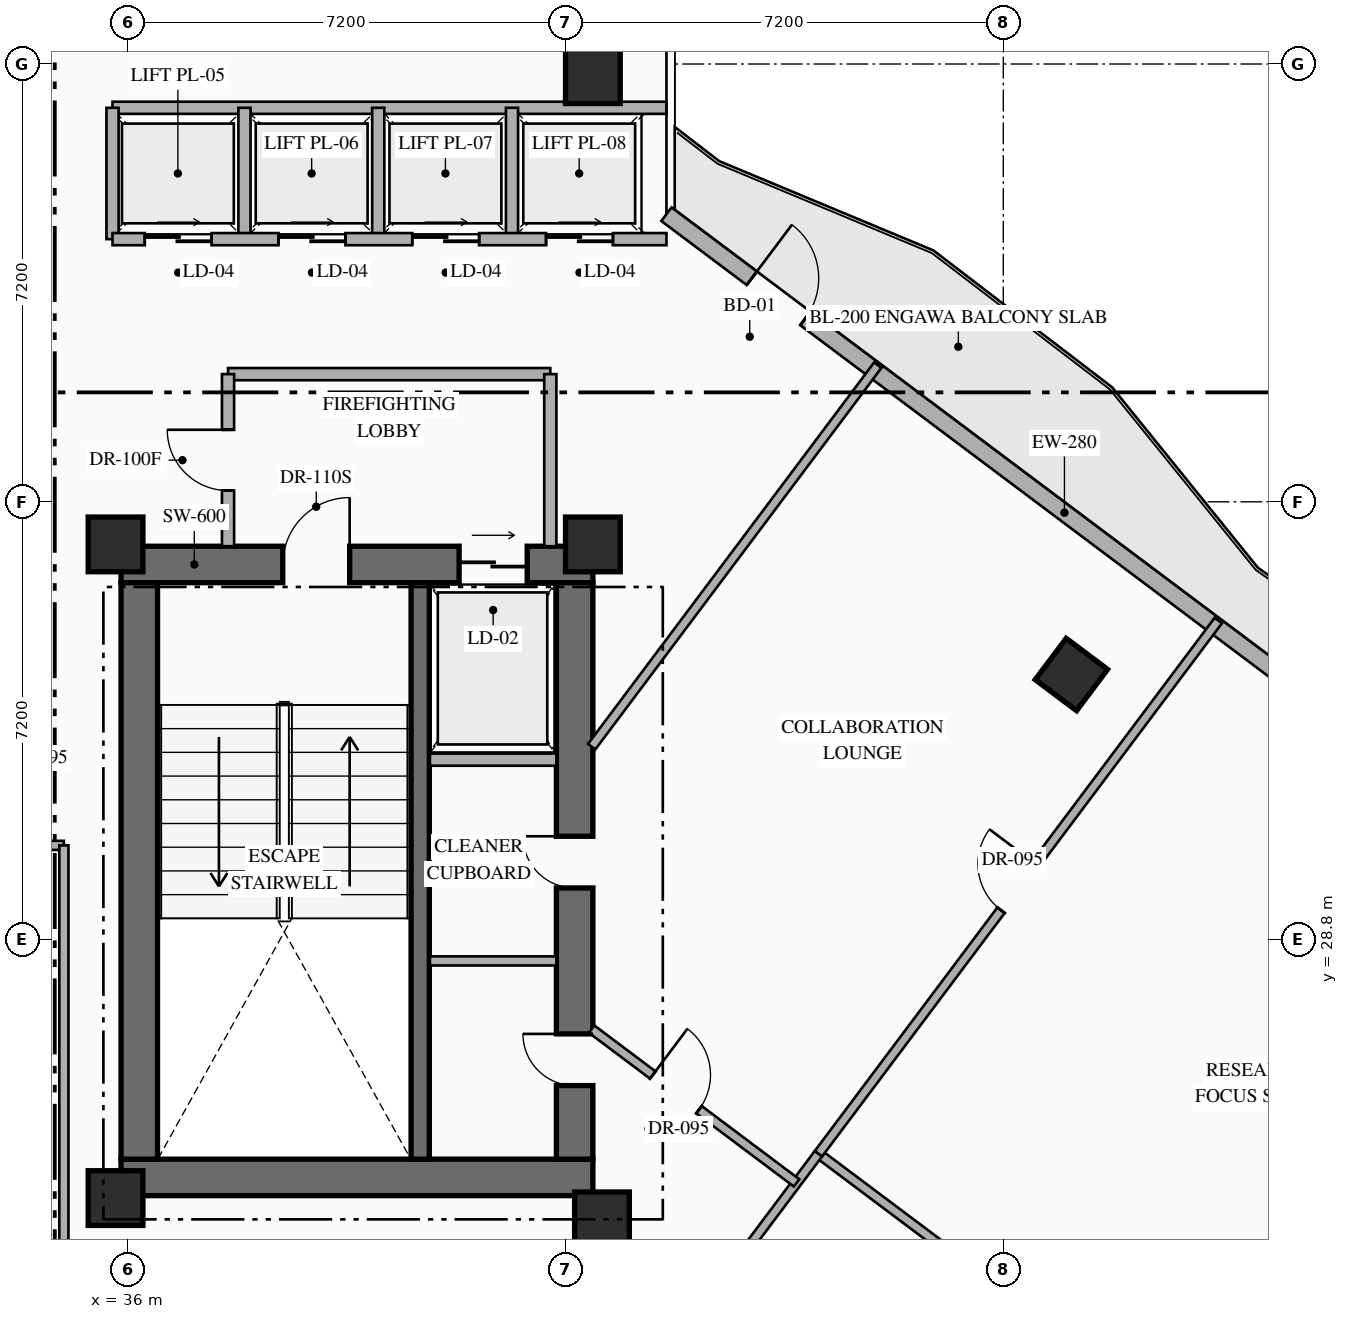
"""IFC4 building model, lengths in metres.
Left out: names, types, materials, properties, quantities, classifications, styles, units other than length and angle.
Written with IfcOpenShell. Run it as: python <this file> out.ifc"""

import sys

from ifc_helpers import new_model, si_unit, direction, frame, frame_2d, origin, origin_2d, place, context, subcontext, project, spatial, rectangle, hollow_rectangle, extrude, element, fill, save


model = new_model("IFC4")
c1 = context("Model", 3, precision=1e-05, world=origin(), true_north=direction((0.0, 1.0)))
c2 = subcontext(c1, "Body", "Model", "MODEL_VIEW")
j1 = project(units=[si_unit("LENGTHUNIT", "METRE"), si_unit("PLANEANGLEUNIT", "RADIAN")], contexts=[c1])
p1 = place(None, origin())
s1 = spatial("IfcSite", under=j1, at=p1, CompositionType="ELEMENT")
p2 = place(p1, origin())
s2 = spatial("IfcBuilding", under=s1, at=p2, CompositionType="ELEMENT")
p3 = place(p2, frame((0.0, 0.0, 156.45)))
s3 = spatial("IfcBuildingStorey", under=s2, at=p3, CompositionType="ELEMENT", Elevation=156.45)
p4 = place(p3, frame((35.89, 24.89, 0.0), z_axis=(0.0, 0.0, 1.0), x_axis=(1.0, 0.0, 0.0)))
e1 = element("IfcWall", 1, at=p4, inside=s3, PredefinedType="SHEAR", context=c2, shape_type="SweptSolid", body=[
    extrude(rectangle(XDim=7.76, YDim=0.6, at=frame_2d((3.88, 0.0))), origin(), (0.0, 0.0, 1.0), 3.6),
])
p5 = place(p3, frame((35.89, 34.97, 0.0), z_axis=(0.0, 0.0, 1.0), x_axis=(1.0, 0.0, 0.0)))
e2 = element("IfcWall", 2, at=p5, inside=s3, PredefinedType="SHEAR", context=c2, shape_type="SweptSolid", body=[
    extrude(rectangle(XDim=7.76, YDim=0.6, at=frame_2d((3.88, 0.0))), origin(), (0.0, 0.0, 1.0), 3.6),
])
p6 = place(p5, frame((2.66, 0.0, 0.0)))
e3 = element("IfcOpeningElement", 3, at=p6, cuts=e2, PredefinedType="OPENING", context=c2, shape_type="SweptSolid", body=[
    extrude(rectangle(XDim=1.1, YDim=2.2, at=frame_2d((0.55, 1.1))), frame((0.0, 0.31, 0.0), z_axis=(0.0, -1.0, 0.0), x_axis=(1.0, 0.0, 0.0)), (0.0, 0.0, 1.0), 0.62),
])
p7 = place(p5, frame((5.56, 0.0, 0.0)))
e4 = element("IfcOpeningElement", 4, at=p7, cuts=e2, PredefinedType="OPENING", context=c2, shape_type="SweptSolid", body=[
    extrude(rectangle(XDim=1.12, YDim=2.15, at=frame_2d((0.56, 1.075))), frame((0.0, 0.31, 0.0), z_axis=(0.0, -1.0, 0.0), x_axis=(1.0, 0.0, 0.0)), (0.0, 0.0, 1.0), 0.62),
])
p8 = place(p3, frame((36.19, 25.19, 0.0), z_axis=(0.0, 0.0, 1.0), x_axis=(0.0, 1.0, 0.0)))
e5 = element("IfcWall", 5, at=p8, inside=s3, PredefinedType="SHEAR", context=c2, shape_type="SweptSolid", body=[
    extrude(rectangle(XDim=9.48, YDim=0.6, at=frame_2d((4.74, 0.0))), origin(), (0.0, 0.0, 1.0), 3.6),
])
p9 = place(p3, frame((43.35, 25.19, 0.0), z_axis=(0.0, 0.0, 1.0), x_axis=(0.0, 1.0, 0.0)))
e6 = element("IfcWall", 6, at=p9, inside=s3, PredefinedType="SHEAR", context=c2, shape_type="SweptSolid", body=[
    extrude(rectangle(XDim=9.48, YDim=0.6, at=frame_2d((4.74, 0.0))), origin(), (0.0, 0.0, 1.0), 3.6),
])
p10 = place(p9, frame((1.21, 0.0, 0.0)))
e7 = element("IfcOpeningElement", 7, at=p10, cuts=e6, PredefinedType="OPENING", context=c2, shape_type="SweptSolid", body=[
    extrude(rectangle(XDim=0.85, YDim=2.08, at=frame_2d((0.425, 1.04))), frame((0.0, 0.31, 0.0), z_axis=(0.0, -1.0, 0.0), x_axis=(1.0, 0.0, 0.0)), (0.0, 0.0, 1.0), 0.62),
])
p11 = place(p9, frame((4.46, 0.0, 0.0)))
e8 = element("IfcOpeningElement", 8, at=p11, cuts=e6, PredefinedType="OPENING", context=c2, shape_type="SweptSolid", body=[
    extrude(rectangle(XDim=0.85, YDim=2.08, at=frame_2d((0.425, 1.04))), frame((0.0, 0.31, 0.0), z_axis=(0.0, -1.0, 0.0), x_axis=(1.0, 0.0, 0.0)), (0.0, 0.0, 1.0), 0.62),
])
p12 = place(p3, frame((40.81, 25.19, 0.0), z_axis=(0.0, 0.0, 1.0), x_axis=(0.0, 1.0, 0.0)))
e9 = element("IfcWall", 9, at=p12, inside=s3, PredefinedType="SHEAR", context=c2, shape_type="SweptSolid", body=[
    extrude(rectangle(XDim=9.48, YDim=0.3, at=frame_2d((4.74, 0.0))), origin(), (0.0, 0.0, 1.0), 3.6),
])
for number, where, z_axis, x_axis in (
    (10, (35.8, 24.55, 0.0), (0.0, 0.0, 1.0), (1.0, 0.0, 0.0)),
    (11, (43.8, 24.2, 0.0), (0.0, 0.0, 1.0), (1.0, 0.0, 0.0)),
    (12, (35.8, 35.3, 0.0), (0.0, 0.0, 1.0), (1.0, 0.0, 0.0)),
    (13, (43.65, 35.3, 0.0), (0.0, 0.0, 1.0), (1.0, 0.0, 0.0)),
    (14, (43.65, 43.0, 0.0), (0.0, 0.0, 1.0), (1.0, 0.0, 0.0)),
):
    element("IfcColumn", number, at=place(p3, frame(where, z_axis=z_axis, x_axis=x_axis)), inside=s3, PredefinedType="COLUMN", context=c2, shape_type="SweptSolid", body=[
        extrude(rectangle(XDim=0.9, YDim=0.9, at=origin_2d()), origin(), (0.0, 0.0, 1.0), 3.6),
    ])
p13 = place(p3, frame((51.52, 33.16, 0.0), z_axis=(0.0, 0.0, 1.0), x_axis=(0.799999996291, -0.600000004945, 0.0)))
e15 = element("IfcColumn", 15, at=p13, inside=s3, PredefinedType="COLUMN", context=c2, shape_type="SweptSolid", body=[
    extrude(hollow_rectangle(XDim=0.85, YDim=0.85, WallThickness=0.032, at=origin_2d()), origin(), (0.0, 0.0, 1.0), 3.6),
])
p14 = place(p3, frame((44.86, 40.73, 0.0), z_axis=(0.0, 0.0, 1.0), x_axis=(0.800007624502, -0.599989833863, 0.0)))
e16 = element("IfcWall", 16, at=p14, inside=s3, PredefinedType="STANDARD", context=c2, shape_type="SweptSolid", body=[
    extrude(rectangle(XDim=19.212, YDim=0.28, at=frame_2d((9.606, 0.0))), origin(), (0.0, 0.0, 1.0), 3.35),
])
p15 = place(p14, frame((1.755, 0.0, 0.0)))
e17 = element("IfcOpeningElement", 17, at=p15, cuts=e16, PredefinedType="OPENING", context=c2, shape_type="SweptSolid", body=[
    extrude(rectangle(XDim=1.1, YDim=2.2, at=frame_2d((0.55, 1.1))), frame((0.0, 0.15, 0.0), z_axis=(0.0, -1.0, 0.0), x_axis=(1.0, 0.0, 0.0)), (0.0, 0.0, 1.0), 0.3),
])
p16 = place(p14, frame((13.509, 0.0, 0.85)))
e18 = element("IfcOpeningElement", 18, at=p16, cuts=e16, PredefinedType="OPENING", context=c2, shape_type="SweptSolid", body=[
    extrude(rectangle(XDim=1.8, YDim=2.1, at=frame_2d((0.9, 1.05))), frame((0.0, 0.15, 0.0), z_axis=(0.0, -1.0, 0.0), x_axis=(1.0, 0.0, 0.0)), (0.0, 0.0, 1.0), 0.3),
])
p17 = place(p3, frame((40.97, 31.76, 0.0), z_axis=(0.0, 0.0, 1.0), x_axis=(1.0, 0.0, 0.0)))
e19 = element("IfcWall", 19, at=p17, inside=s3, PredefinedType="STANDARD", context=c2, shape_type="SweptSolid", body=[
    extrude(rectangle(XDim=2.08, YDim=0.2, at=frame_2d((1.04, 0.0))), origin(), (0.0, 0.0, 1.0), 3.35),
])
p18 = place(p3, frame((40.97, 28.45, 0.0), z_axis=(0.0, 0.0, 1.0), x_axis=(1.0, 0.0, 0.0)))
e20 = element("IfcWall", 20, at=p18, inside=s3, PredefinedType="PARTITIONING", context=c2, shape_type="SweptSolid", body=[
    extrude(rectangle(XDim=2.08, YDim=0.15, at=frame_2d((1.04, 0.0))), origin(), (0.0, 0.0, 1.0), 3.35),
])
p19 = place(p3, frame((37.65, 38.1, 0.0), z_axis=(0.0, 0.0, 1.0), x_axis=(1.0, 0.0, 0.0)))
e21 = element("IfcWall", 21, at=p19, inside=s3, PredefinedType="STANDARD", context=c2, shape_type="SweptSolid", body=[
    extrude(rectangle(XDim=5.3, YDim=0.2, at=frame_2d((2.65, 0.0))), origin(), (0.0, 0.0, 1.0), 3.35),
])
p20 = place(p3, frame((42.95, 35.27, 0.0), z_axis=(0.0, 0.0, 1.0), x_axis=(0.0, 1.0, 0.0)))
e22 = element("IfcWall", 22, at=p20, inside=s3, PredefinedType="STANDARD", context=c2, shape_type="SweptSolid", body=[
    extrude(rectangle(XDim=2.83, YDim=0.2, at=frame_2d((1.415, 0.0))), origin(), (0.0, 0.0, 1.0), 3.35),
])
p21 = place(p3, frame((37.65, 35.27, 0.0), z_axis=(0.0, 0.0, 1.0), x_axis=(0.0, 1.0, 0.0)))
e23 = element("IfcWall", 23, at=p21, inside=s3, PredefinedType="STANDARD", context=c2, shape_type="SweptSolid", body=[
    extrude(rectangle(XDim=2.83, YDim=0.2, at=frame_2d((1.415, 0.0))), origin(), (0.0, 0.0, 1.0), 3.35),
])
p22 = place(p21, frame((0.915, 0.0, 0.0)))
e24 = element("IfcOpeningElement", 24, at=p22, cuts=e23, PredefinedType="OPENING", context=c2, shape_type="SweptSolid", body=[
    extrude(rectangle(XDim=1.0, YDim=2.2, at=frame_2d((0.5, 1.1))), frame((0.0, 0.11, 0.0), z_axis=(0.0, -1.0, 0.0), x_axis=(1.0, 0.0, 0.0)), (0.0, 0.0, 1.0), 0.22),
])
p23 = place(p3, frame((35.75, 42.48, 0.0), z_axis=(0.0, 0.0, 1.0), x_axis=(1.0, 0.0, 0.0)))
e25 = element("IfcWall", 25, at=p23, inside=s3, PredefinedType="STANDARD", context=c2, shape_type="SweptSolid", body=[
    extrude(rectangle(XDim=9.11, YDim=0.2, at=frame_2d((4.555, 0.0))), origin(), (0.0, 0.0, 1.0), 3.35),
])
for number, where, z_axis, x_axis in (
    (26, (35.75, 40.32, 0.0), (0.0, 0.0, 1.0), (0.0, 1.0, 0.0)),
    (27, (37.92, 40.32, 0.0), (0.0, 0.0, 1.0), (0.0, 1.0, 0.0)),
    (28, (40.12, 40.32, 0.0), (0.0, 0.0, 1.0), (0.0, 1.0, 0.0)),
    (29, (42.32, 40.32, 0.0), (0.0, 0.0, 1.0), (0.0, 1.0, 0.0)),
):
    element("IfcWall", number, at=place(p3, frame(where, z_axis=z_axis, x_axis=x_axis)), inside=s3, PredefinedType="STANDARD", context=c2, shape_type="SweptSolid", body=[
        extrude(rectangle(XDim=2.16, YDim=0.2, at=frame_2d((1.08, 0.0))), origin(), (0.0, 0.0, 1.0), 3.35),
    ])
p24 = place(p3, frame((35.75, 40.32, 0.0), z_axis=(0.0, 0.0, 1.0), x_axis=(1.0, 0.0, 0.0)))
e30 = element("IfcWall", 30, at=p24, inside=s3, PredefinedType="STANDARD", context=c2, shape_type="SweptSolid", body=[
    extrude(rectangle(XDim=9.11, YDim=0.2, at=frame_2d((4.555, 0.0))), origin(), (0.0, 0.0, 1.0), 3.35),
])
p25 = place(p24, frame((0.53, 0.0, 0.0)))
e31 = element("IfcOpeningElement", 31, at=p25, cuts=e30, PredefinedType="OPENING", context=c2, shape_type="SweptSolid", body=[
    extrude(rectangle(XDim=1.1, YDim=2.18, at=frame_2d((0.55, 1.09))), frame((0.0, 0.11, 0.0), z_axis=(0.0, -1.0, 0.0), x_axis=(1.0, 0.0, 0.0)), (0.0, 0.0, 1.0), 0.22),
])
p26 = place(p24, frame((2.73, 0.0, 0.0)))
e32 = element("IfcOpeningElement", 32, at=p26, cuts=e30, PredefinedType="OPENING", context=c2, shape_type="SweptSolid", body=[
    extrude(rectangle(XDim=1.1, YDim=2.18, at=frame_2d((0.55, 1.09))), frame((0.0, 0.11, 0.0), z_axis=(0.0, -1.0, 0.0), x_axis=(1.0, 0.0, 0.0)), (0.0, 0.0, 1.0), 0.22),
])
p27 = place(p24, frame((4.93, 0.0, 0.0)))
e33 = element("IfcOpeningElement", 33, at=p27, cuts=e30, PredefinedType="OPENING", context=c2, shape_type="SweptSolid", body=[
    extrude(rectangle(XDim=1.1, YDim=2.18, at=frame_2d((0.55, 1.09))), frame((0.0, 0.11, 0.0), z_axis=(0.0, -1.0, 0.0), x_axis=(1.0, 0.0, 0.0)), (0.0, 0.0, 1.0), 0.22),
])
p28 = place(p24, frame((7.13, 0.0, 0.0)))
e34 = element("IfcOpeningElement", 34, at=p28, cuts=e30, PredefinedType="OPENING", context=c2, shape_type="SweptSolid", body=[
    extrude(rectangle(XDim=1.1, YDim=2.18, at=frame_2d((0.55, 1.09))), frame((0.0, 0.11, 0.0), z_axis=(0.0, -1.0, 0.0), x_axis=(1.0, 0.0, 0.0)), (0.0, 0.0, 1.0), 0.22),
])
p29 = place(p3, frame((30.5, 30.35, 0.0), z_axis=(0.0, 0.0, 1.0), x_axis=(1.0, 0.0, 0.0)))
e35 = element("IfcWall", 35, at=p29, inside=s3, PredefinedType="PARTITIONING", context=c2, shape_type="SweptSolid", body=[
    extrude(rectangle(XDim=4.45, YDim=0.15, at=frame_2d((2.225, 0.0))), origin(), (0.0, 0.0, 1.0), 3.35),
])
p30 = place(p29, frame((2.846, 0.0, 0.0)))
e36 = element("IfcOpeningElement", 36, at=p30, cuts=e35, PredefinedType="OPENING", context=c2, shape_type="SweptSolid", body=[
    extrude(rectangle(XDim=0.95, YDim=2.15, at=frame_2d((0.475, 1.075))), frame((0.0, 0.085, 0.0), z_axis=(0.0, -1.0, 0.0), x_axis=(1.0, 0.0, 0.0)), (0.0, 0.0, 1.0), 0.17),
])
p31 = place(p3, frame((34.95, 23.2, 0.0), z_axis=(0.0, 0.0, 1.0), x_axis=(0.0, 1.0, 0.0)))
e37 = element("IfcWall", 37, at=p31, inside=s3, PredefinedType="PARTITIONING", context=c2, shape_type="SweptSolid", body=[
    extrude(rectangle(XDim=7.15, YDim=0.15, at=frame_2d((3.575, 0.0))), origin(), (0.0, 0.0, 1.0), 3.35),
])
p32 = place(p3, frame((47.36, 25.28, 0.0), z_axis=(0.0, 0.0, 1.0), x_axis=(0.799991516197, -0.600011311571, 0.0)))
e38 = element("IfcWall", 38, at=p32, inside=s3, PredefinedType="PARTITIONING", context=c2, shape_type="SweptSolid", body=[
    extrude(rectangle(XDim=10.36, YDim=0.15, at=frame_2d((5.18, 0.0))), origin(), (0.0, 0.0, 1.0), 3.35),
])
p33 = place(p3, frame((41.87, 17.96, 0.0), z_axis=(0.0, 0.0, 1.0), x_axis=(0.599995730889, 0.800003201816, 0.0)))
e39 = element("IfcWall", 39, at=p33, inside=s3, PredefinedType="PARTITIONING", context=c2, shape_type="SweptSolid", body=[
    extrude(rectangle(XDim=9.15, YDim=0.15, at=frame_2d((4.575, 0.0))), origin(), (0.0, 0.0, 1.0), 3.35),
])
p34 = place(p33, frame((4.1, 0.0, 0.0)))
e40 = element("IfcOpeningElement", 40, at=p34, cuts=e39, PredefinedType="OPENING", context=c2, shape_type="SweptSolid", body=[
    extrude(rectangle(XDim=0.95, YDim=2.15, at=frame_2d((0.475, 1.075))), frame((0.0, 0.085, 0.0), z_axis=(0.0, -1.0, 0.0), x_axis=(1.0, 0.0, 0.0)), (0.0, 0.0, 1.0), 0.17),
])
p35 = place(p3, frame((47.36, 25.28, 0.0), z_axis=(0.0, 0.0, 1.0), x_axis=(0.599992871789, 0.800005346109, 0.0)))
e41 = element("IfcWall", 41, at=p35, inside=s3, PredefinedType="PARTITIONING", context=c2, shape_type="SweptSolid", body=[
    extrude(rectangle(XDim=10.96, YDim=0.15, at=frame_2d((5.48, 0.0))), origin(), (0.0, 0.0, 1.0), 3.35),
])
p36 = place(p35, frame((5.005, 0.0, 0.0)))
e42 = element("IfcOpeningElement", 42, at=p36, cuts=e41, PredefinedType="OPENING", context=c2, shape_type="SweptSolid", body=[
    extrude(rectangle(XDim=0.95, YDim=2.15, at=frame_2d((0.475, 1.075))), frame((0.0, 0.085, 0.0), z_axis=(0.0, -1.0, 0.0), x_axis=(1.0, 0.0, 0.0)), (0.0, 0.0, 1.0), 0.17),
])
p37 = place(p3, frame((43.63, 27.328, 0.0), z_axis=(0.0, 0.0, 1.0), x_axis=(0.799972182084, -0.600037088764, 0.0)))
e43 = element("IfcWall", 43, at=p37, inside=s3, PredefinedType="PARTITIONING", context=c2, shape_type="SweptSolid", body=[
    extrude(rectangle(XDim=4.213, YDim=0.15, at=frame_2d((2.106, 0.0))), origin(), (0.0, 0.0, 1.0), 3.045),
])
p38 = place(p37, frame((1.256, 0.0, 0.0)))
e44 = element("IfcOpeningElement", 44, at=p38, cuts=e43, PredefinedType="OPENING", context=c2, shape_type="SweptSolid", body=[
    extrude(rectangle(XDim=0.95, YDim=2.15, at=frame_2d((0.475, 1.075))), frame((0.0, 0.085, 0.0), z_axis=(0.0, -1.0, 0.0), x_axis=(1.0, 0.0, 0.0)), (0.0, 0.0, 1.0), 0.17),
])
p39 = place(p3, frame((43.63, 31.973, 0.0), z_axis=(0.0, 0.0, 1.0), x_axis=(0.599975099311, 0.800018674911, 0.0)))
e45 = element("IfcWall", 45, at=p39, inside=s3, PredefinedType="PARTITIONING", context=c2, shape_type="SweptSolid", body=[
    extrude(rectangle(XDim=7.844, YDim=0.15, at=frame_2d((3.922, 0.0))), origin(), (0.0, 0.0, 1.0), 3.35),
])
p40 = place(p3, frame((27.91, 26.68, 0.0), z_axis=(0.0, 0.0, 1.0), x_axis=(0.800005938517, -0.599992081896, 0.0)))
e46 = element("IfcWall", 46, at=p40, inside=s3, PredefinedType="PARTITIONING", context=c2, shape_type="SweptSolid", body=[
    extrude(rectangle(XDim=14.8, YDim=0.15, at=frame_2d((7.4, 0.0))), origin(), (0.0, 0.0, 1.0), 3.35),
])
p41 = place(p40, frame((9.281, 0.0, 0.0)))
e47 = element("IfcOpeningElement", 47, at=p41, cuts=e46, PredefinedType="OPENING", context=c2, shape_type="SweptSolid", body=[
    extrude(rectangle(XDim=0.95, YDim=2.15, at=frame_2d((0.475, 1.075))), frame((0.0, 0.085, 0.0), z_axis=(0.0, -1.0, 0.0), x_axis=(1.0, 0.0, 0.0)), (0.0, 0.0, 1.0), 0.17),
])
p42 = place(p15, origin())
e48 = element("IfcDoor", 48, at=p42, inside=s3, OperationType="SINGLE_SWING_LEFT", PredefinedType="DOOR", context=c2, shape_type="SweptSolid", body=[
    extrude(rectangle(XDim=1.1, YDim=2.2, at=frame_2d((0.55, 1.1))), frame((0.0, 0.025, 0.0), z_axis=(0.0, -1.0, 0.0), x_axis=(1.0, 0.0, 0.0)), (0.0, 0.0, 1.0), 0.05),
])
fill(e17, e48)
p43 = place(p6, origin())
e49 = element("IfcDoor", 49, at=p43, inside=s3, OperationType="SINGLE_SWING_RIGHT", PredefinedType="DOOR", context=c2, shape_type="SweptSolid", body=[
    extrude(rectangle(XDim=1.1, YDim=2.2, at=frame_2d((0.55, 1.1))), frame((0.0, 0.025, 0.0), z_axis=(0.0, -1.0, 0.0), x_axis=(1.0, 0.0, 0.0)), (0.0, 0.0, 1.0), 0.05),
])
fill(e3, e49)
p44 = place(p7, origin())
e50 = element("IfcDoor", 50, at=p44, inside=s3, OperationType="SLIDING_TO_RIGHT", PredefinedType="USERDEFINED", context=c2, shape_type="SweptSolid", body=[
    extrude(rectangle(XDim=1.12, YDim=2.15, at=frame_2d((0.56, 1.075))), frame((0.0, 0.025, 0.0), z_axis=(0.0, -1.0, 0.0), x_axis=(1.0, 0.0, 0.0)), (0.0, 0.0, 1.0), 0.05),
])
fill(e4, e50)
p45 = place(p10, origin())
e51 = element("IfcDoor", 51, at=p45, inside=s3, OperationType="SINGLE_SWING_RIGHT", PredefinedType="DOOR", context=c2, shape_type="SweptSolid", body=[
    extrude(rectangle(XDim=0.85, YDim=2.08, at=frame_2d((0.425, 1.04))), frame((0.0, 0.025, 0.0), z_axis=(0.0, -1.0, 0.0), x_axis=(1.0, 0.0, 0.0)), (0.0, 0.0, 1.0), 0.05),
])
fill(e7, e51)
p46 = place(p11, origin())
e52 = element("IfcDoor", 52, at=p46, inside=s3, OperationType="SINGLE_SWING_RIGHT", PredefinedType="DOOR", context=c2, shape_type="SweptSolid", body=[
    extrude(rectangle(XDim=0.85, YDim=2.08, at=frame_2d((0.425, 1.04))), frame((0.0, 0.025, 0.0), z_axis=(0.0, -1.0, 0.0), x_axis=(1.0, 0.0, 0.0)), (0.0, 0.0, 1.0), 0.05),
])
fill(e8, e52)
p47 = place(p22, origin())
e53 = element("IfcDoor", 53, at=p47, inside=s3, OperationType="SINGLE_SWING_RIGHT", PredefinedType="DOOR", context=c2, shape_type="SweptSolid", body=[
    extrude(rectangle(XDim=1.0, YDim=2.2, at=frame_2d((0.5, 1.1))), frame((0.0, 0.025, 0.0), z_axis=(0.0, -1.0, 0.0), x_axis=(1.0, 0.0, 0.0)), (0.0, 0.0, 1.0), 0.05),
])
fill(e24, e53)
p48 = place(p25, origin())
e54 = element("IfcDoor", 54, at=p48, inside=s3, OperationType="SLIDING_TO_RIGHT", PredefinedType="USERDEFINED", context=c2, shape_type="SweptSolid", body=[
    extrude(rectangle(XDim=1.1, YDim=2.18, at=frame_2d((0.55, 1.09))), frame((0.0, 0.025, 0.0), z_axis=(0.0, -1.0, 0.0), x_axis=(1.0, 0.0, 0.0)), (0.0, 0.0, 1.0), 0.05),
])
fill(e31, e54)
p49 = place(p26, origin())
e55 = element("IfcDoor", 55, at=p49, inside=s3, OperationType="SLIDING_TO_RIGHT", PredefinedType="USERDEFINED", context=c2, shape_type="SweptSolid", body=[
    extrude(rectangle(XDim=1.1, YDim=2.18, at=frame_2d((0.55, 1.09))), frame((0.0, 0.025, 0.0), z_axis=(0.0, -1.0, 0.0), x_axis=(1.0, 0.0, 0.0)), (0.0, 0.0, 1.0), 0.05),
])
fill(e32, e55)
p50 = place(p27, origin())
e56 = element("IfcDoor", 56, at=p50, inside=s3, OperationType="SLIDING_TO_RIGHT", PredefinedType="USERDEFINED", context=c2, shape_type="SweptSolid", body=[
    extrude(rectangle(XDim=1.1, YDim=2.18, at=frame_2d((0.55, 1.09))), frame((0.0, 0.025, 0.0), z_axis=(0.0, -1.0, 0.0), x_axis=(1.0, 0.0, 0.0)), (0.0, 0.0, 1.0), 0.05),
])
fill(e33, e56)
p51 = place(p28, origin())
e57 = element("IfcDoor", 57, at=p51, inside=s3, OperationType="SLIDING_TO_RIGHT", PredefinedType="USERDEFINED", context=c2, shape_type="SweptSolid", body=[
    extrude(rectangle(XDim=1.1, YDim=2.18, at=frame_2d((0.55, 1.09))), frame((0.0, 0.025, 0.0), z_axis=(0.0, -1.0, 0.0), x_axis=(1.0, 0.0, 0.0)), (0.0, 0.0, 1.0), 0.05),
])
fill(e34, e57)
p52 = place(p36, origin())
e58 = element("IfcDoor", 58, at=p52, inside=s3, OperationType="SINGLE_SWING_RIGHT", PredefinedType="DOOR", context=c2, shape_type="SweptSolid", body=[
    extrude(rectangle(XDim=0.95, YDim=2.15, at=frame_2d((0.475, 1.075))), frame((0.0, 0.025, 0.0), z_axis=(0.0, -1.0, 0.0), x_axis=(1.0, 0.0, 0.0)), (0.0, 0.0, 1.0), 0.05),
])
fill(e42, e58)
p53 = place(p38, origin())
e59 = element("IfcDoor", 59, at=p53, inside=s3, OperationType="SINGLE_SWING_LEFT", PredefinedType="DOOR", context=c2, shape_type="SweptSolid", body=[
    extrude(rectangle(XDim=0.95, YDim=2.15, at=frame_2d((0.475, 1.075))), frame((0.0, 0.025, 0.0), z_axis=(0.0, -1.0, 0.0), x_axis=(1.0, 0.0, 0.0)), (0.0, 0.0, 1.0), 0.05),
])
fill(e44, e59)
save(model, sys.argv[1])
